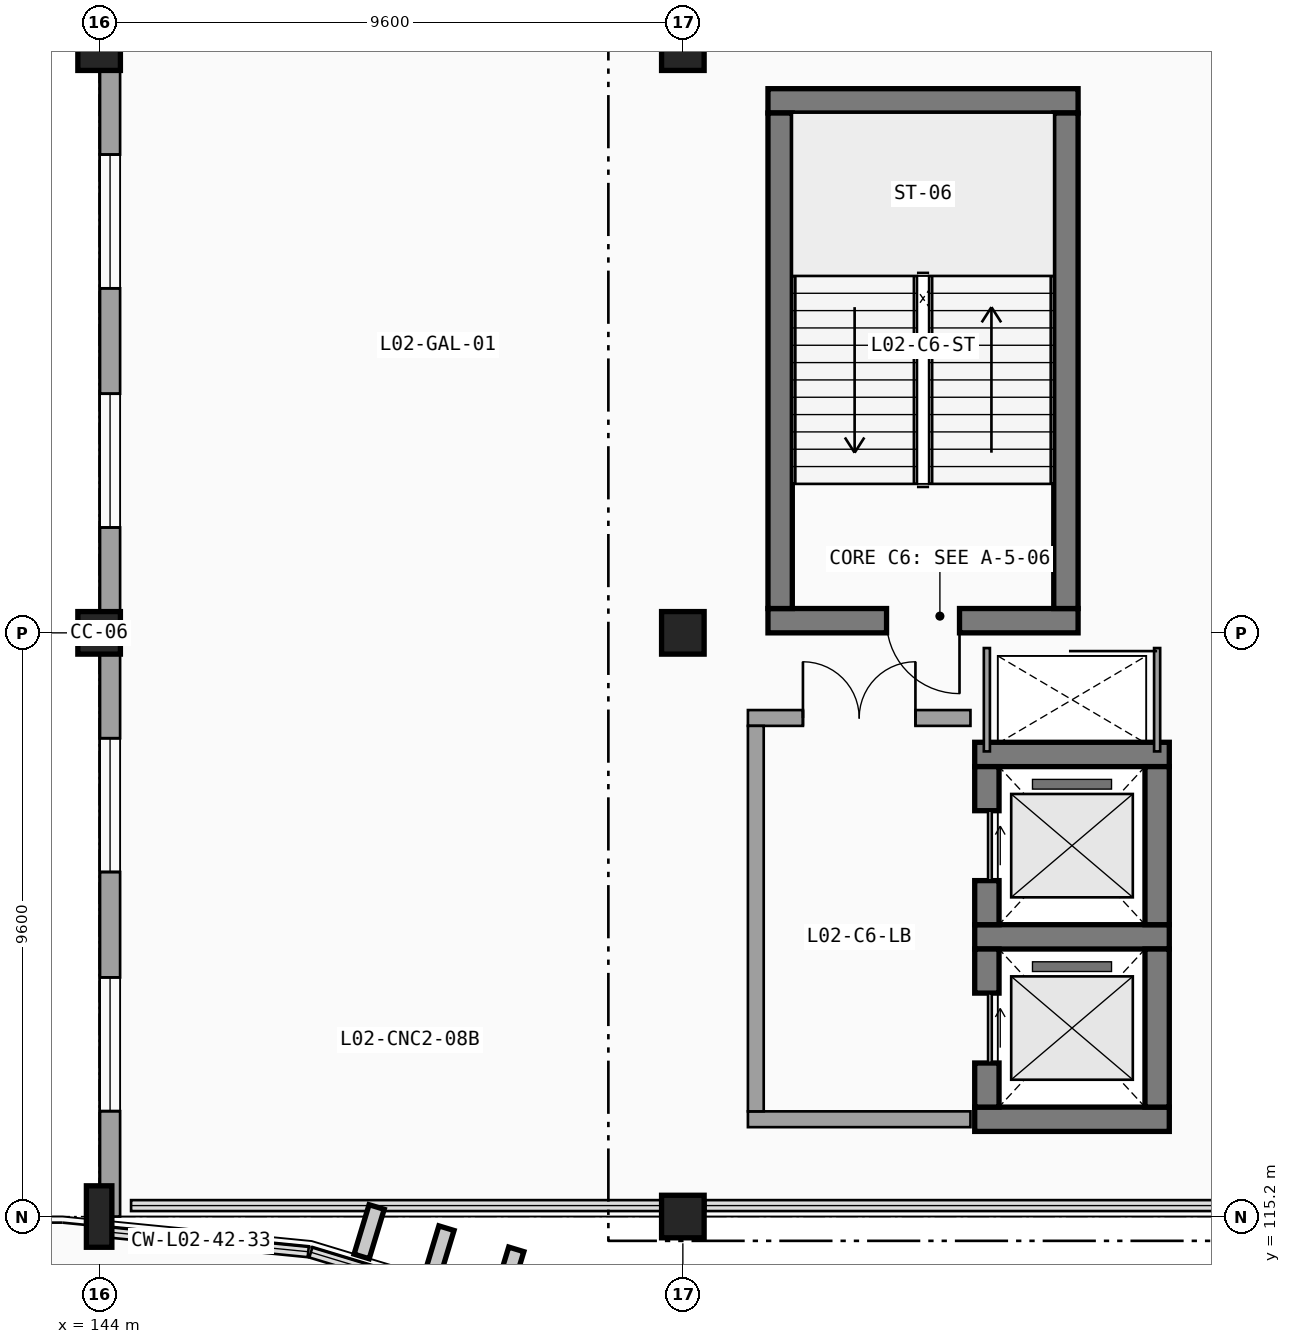
"""IFC4 building model, lengths in metres.
Left out: names, types, materials, properties, quantities, classifications, styles, units other than length and angle.
Written with IfcOpenShell. Run it as: python <this file> out.ifc"""

import sys

from ifc_helpers import new_model, si_unit, direction, frame, frame_2d, origin, origin_2d, place, context, subcontext, project, spatial, rectangle, i_section, extrude, element, fill, save


model = new_model("IFC4")
c1 = context("Model", 3, precision=1e-05, world=origin(), true_north=direction((0.0, 1.0)))
c2 = subcontext(c1, "Body", "Model", "MODEL_VIEW")
j1 = project(units=[si_unit("LENGTHUNIT", "METRE"), si_unit("PLANEANGLEUNIT", "RADIAN")], contexts=[c1])
p1 = place(None, origin())
s1 = spatial("IfcSite", under=j1, at=p1, CompositionType="ELEMENT")
p2 = place(p1, origin())
s2 = spatial("IfcBuilding", under=s1, at=p2, CompositionType="ELEMENT")
p3 = place(p2, frame((0.0, 0.0, 9.6)))
s3 = spatial("IfcBuildingStorey", under=s2, at=p3, CompositionType="ELEMENT", Elevation=9.6)
p4 = place(p3, frame((144.0, 115.2, 0.0), z_axis=(0.0, 0.0, 1.0), x_axis=(1.0, 0.0, 0.0)))
e1 = element("IfcColumn", 1, at=p4, inside=s3, PredefinedType="COLUMN", context=c2, shape_type="SweptSolid", body=[
    extrude(i_section(OverallWidth=0.419, OverallDepth=1.011, WebThickness=0.024, FlangeThickness=0.042, FilletRadius=0.031, at=origin_2d()), origin(), (0.0, 0.0, 1.0), 4.5),
])
for number, where, z_axis, x_axis in (
    (2, (144.0, 124.8, 0.0), (0.0, 0.0, 1.0), (1.0, 0.0, 0.0)),
    (3, (144.0, 134.4, 0.0), (0.0, 0.0, 1.0), (1.0, 0.0, 0.0)),
    (4, (153.6, 115.2, 0.0), (0.0, 0.0, 1.0), (1.0, 0.0, 0.0)),
    (5, (153.6, 124.8, 0.0), (0.0, 0.0, 1.0), (1.0, 0.0, 0.0)),
    (6, (153.6, 134.4, 0.0), (0.0, 0.0, 1.0), (1.0, 0.0, 0.0)),
):
    element("IfcColumn", number, at=place(p3, frame(where, z_axis=z_axis, x_axis=x_axis)), inside=s3, PredefinedType="COLUMN", context=c2, shape_type="SweptSolid", body=[
        extrude(rectangle(XDim=0.7, YDim=0.7, at=origin_2d()), origin(), (0.0, 0.0, 1.0), 4.5),
    ])
p5 = place(p3, frame((144.18, 134.4, 0.0), z_axis=(0.0, 0.0, 1.0), x_axis=(0.0, -1.0, 0.0)))
e7 = element("IfcWall", 7, at=p5, inside=s3, PredefinedType="SOLIDWALL", context=c2, shape_type="SweptSolid", body=[
    extrude(rectangle(XDim=9.6, YDim=0.33, at=frame_2d((4.8, 0.0))), origin(), (0.0, 0.0, 1.0), 3.613),
])
p6 = place(p5, frame((3.933, 0.0, 0.95), z_axis=(0.0, 0.0, 1.0), x_axis=(-1.0, 0.0, 0.0)))
e8 = element("IfcOpeningElement", 8, at=p6, cuts=e7, PredefinedType="OPENING", context=c2, shape_type="SweptSolid", body=[
    extrude(rectangle(XDim=2.2, YDim=2.1, at=frame_2d((1.1, 1.05))), frame((0.0, 0.175, 0.0), z_axis=(0.0, -1.0, 0.0), x_axis=(1.0, 0.0, 0.0)), (0.0, 0.0, 1.0), 0.35),
])
p7 = place(p5, frame((7.867, 0.0, 0.95), z_axis=(0.0, 0.0, 1.0), x_axis=(-1.0, 0.0, 0.0)))
e9 = element("IfcOpeningElement", 9, at=p7, cuts=e7, PredefinedType="OPENING", context=c2, shape_type="SweptSolid", body=[
    extrude(rectangle(XDim=2.2, YDim=2.1, at=frame_2d((1.1, 1.05))), frame((0.0, 0.175, 0.0), z_axis=(0.0, -1.0, 0.0), x_axis=(1.0, 0.0, 0.0)), (0.0, 0.0, 1.0), 0.35),
])
p8 = place(p3, frame((144.18, 124.8, 0.0), z_axis=(0.0, 0.0, 1.0), x_axis=(0.0, -1.0, 0.0)))
e10 = element("IfcWall", 10, at=p8, inside=s3, PredefinedType="SOLIDWALL", context=c2, shape_type="SweptSolid", body=[
    extrude(rectangle(XDim=9.6, YDim=0.33, at=frame_2d((4.8, 0.0))), origin(), (0.0, 0.0, 1.0), 3.293),
])
p9 = place(p8, frame((3.933, 0.0, 0.95), z_axis=(0.0, 0.0, 1.0), x_axis=(-1.0, 0.0, 0.0)))
e11 = element("IfcOpeningElement", 11, at=p9, cuts=e10, PredefinedType="OPENING", context=c2, shape_type="SweptSolid", body=[
    extrude(rectangle(XDim=2.2, YDim=2.1, at=frame_2d((1.1, 1.05))), frame((0.0, 0.175, 0.0), z_axis=(0.0, -1.0, 0.0), x_axis=(1.0, 0.0, 0.0)), (0.0, 0.0, 1.0), 0.35),
])
p10 = place(p8, frame((7.867, 0.0, 0.95), z_axis=(0.0, 0.0, 1.0), x_axis=(-1.0, 0.0, 0.0)))
e12 = element("IfcOpeningElement", 12, at=p10, cuts=e10, PredefinedType="OPENING", context=c2, shape_type="SweptSolid", body=[
    extrude(rectangle(XDim=2.2, YDim=2.1, at=frame_2d((1.1, 1.05))), frame((0.0, 0.175, 0.0), z_axis=(0.0, -1.0, 0.0), x_axis=(1.0, 0.0, 0.0)), (0.0, 0.0, 1.0), 0.35),
])
p11 = place(p3, frame((155.0, 125.0, 0.0), z_axis=(0.0, 0.0, 1.0), x_axis=(1.0, 0.0, 0.0)))
e13 = element("IfcWall", 13, at=p11, inside=s3, PredefinedType="SHEAR", context=c2, shape_type="SweptSolid", body=[
    extrude(rectangle(XDim=5.1, YDim=0.4, at=frame_2d((2.55, 0.0))), origin(), (0.0, 0.0, 1.0), 4.22),
])
p12 = place(p11, frame((3.15, 0.0, 0.0), z_axis=(0.0, 0.0, 1.0), x_axis=(-1.0, 0.0, 0.0)))
e14 = element("IfcOpeningElement", 14, at=p12, cuts=e13, PredefinedType="OPENING", context=c2, shape_type="SweptSolid", body=[
    extrude(rectangle(XDim=1.2, YDim=2.2, at=frame_2d((0.6, 1.1))), frame((0.0, 0.21, 0.0), z_axis=(0.0, -1.0, 0.0), x_axis=(1.0, 0.0, 0.0)), (0.0, 0.0, 1.0), 0.42),
])
p13 = place(p3, frame((160.1, 133.55, 0.0), z_axis=(0.0, 0.0, 1.0), x_axis=(-1.0, 0.0, 0.0)))
e15 = element("IfcWall", 15, at=p13, inside=s3, PredefinedType="SHEAR", context=c2, shape_type="SweptSolid", body=[
    extrude(rectangle(XDim=5.1, YDim=0.4, at=frame_2d((2.55, 0.0))), origin(), (0.0, 0.0, 1.0), 4.22),
])
for number, where, z_axis, x_axis in (
    (16, (155.2, 133.35, 0.0), (0.0, 0.0, 1.0), (0.0, -1.0, 0.0)),
    (17, (159.9, 125.2, 0.0), (0.0, 0.0, 1.0), (0.0, 1.0, 0.0)),
):
    element("IfcWall", number, at=place(p3, frame(where, z_axis=z_axis, x_axis=x_axis)), inside=s3, PredefinedType="SHEAR", context=c2, shape_type="SweptSolid", body=[
        extrude(rectangle(XDim=8.15, YDim=0.4, at=frame_2d((4.075, 0.0))), origin(), (0.0, 0.0, 1.0), 4.22),
    ])
for number, where, z_axis, x_axis in (
    (18, (158.4, 116.8, 0.0), (0.0, 0.0, 1.0), (1.0, 0.0, 0.0)),
    (19, (161.6, 119.8, 0.0), (0.0, 0.0, 1.0), (-1.0, 0.0, 0.0)),
):
    element("IfcWall", number, at=place(p3, frame(where, z_axis=z_axis, x_axis=x_axis)), inside=s3, PredefinedType="SHEAR", context=c2, shape_type="SweptSolid", body=[
        extrude(rectangle(XDim=3.2, YDim=0.4, at=frame_2d((1.6, 0.0))), origin(), (0.0, 0.0, 1.0), 4.22),
    ])
p14 = place(p3, frame((158.6, 119.6, 0.0), z_axis=(0.0, 0.0, 1.0), x_axis=(0.0, -1.0, 0.0)))
e20 = element("IfcWall", 20, at=p14, inside=s3, PredefinedType="SHEAR", context=c2, shape_type="SweptSolid", body=[
    extrude(rectangle(XDim=2.6, YDim=0.4, at=frame_2d((1.3, 0.0))), origin(), (0.0, 0.0, 1.0), 4.22),
])
p15 = place(p14, frame((0.725, 0.0, 0.0), z_axis=(0.0, 0.0, 1.0), x_axis=(1.0, 0.0, 0.0)))
e21 = element("IfcOpeningElement", 21, at=p15, cuts=e20, PredefinedType="OPENING", context=c2, shape_type="SweptSolid", body=[
    extrude(rectangle(XDim=1.15, YDim=2.2, at=frame_2d((0.575, 1.1))), frame((0.0, 0.21, 0.0), z_axis=(0.0, -1.0, 0.0), x_axis=(1.0, 0.0, 0.0)), (0.0, 0.0, 1.0), 0.42),
])
p16 = place(p3, frame((161.4, 117.0, 0.0), z_axis=(0.0, 0.0, 1.0), x_axis=(0.0, 1.0, 0.0)))
e22 = element("IfcWall", 22, at=p16, inside=s3, PredefinedType="SHEAR", context=c2, shape_type="SweptSolid", body=[
    extrude(rectangle(XDim=2.6, YDim=0.4, at=frame_2d((1.3, 0.0))), origin(), (0.0, 0.0, 1.0), 4.22),
])
p17 = place(p3, frame((161.6, 122.8, 0.0), z_axis=(0.0, 0.0, 1.0), x_axis=(-1.0, 0.0, 0.0)))
e23 = element("IfcWall", 23, at=p17, inside=s3, PredefinedType="SHEAR", context=c2, shape_type="SweptSolid", body=[
    extrude(rectangle(XDim=3.2, YDim=0.4, at=frame_2d((1.6, 0.0))), origin(), (0.0, 0.0, 1.0), 4.22),
])
p18 = place(p3, frame((158.6, 122.6, 0.0), z_axis=(0.0, 0.0, 1.0), x_axis=(0.0, -1.0, 0.0)))
e24 = element("IfcWall", 24, at=p18, inside=s3, PredefinedType="SHEAR", context=c2, shape_type="SweptSolid", body=[
    extrude(rectangle(XDim=2.6, YDim=0.4, at=frame_2d((1.3, 0.0))), origin(), (0.0, 0.0, 1.0), 4.22),
])
p19 = place(p18, frame((0.725, 0.0, 0.0), z_axis=(0.0, 0.0, 1.0), x_axis=(1.0, 0.0, 0.0)))
e25 = element("IfcOpeningElement", 25, at=p19, cuts=e24, PredefinedType="OPENING", context=c2, shape_type="SweptSolid", body=[
    extrude(rectangle(XDim=1.15, YDim=2.2, at=frame_2d((0.575, 1.1))), frame((0.0, 0.21, 0.0), z_axis=(0.0, -1.0, 0.0), x_axis=(1.0, 0.0, 0.0)), (0.0, 0.0, 1.0), 0.42),
])
p20 = place(p3, frame((161.4, 120.0, 0.0), z_axis=(0.0, 0.0, 1.0), x_axis=(0.0, 1.0, 0.0)))
e26 = element("IfcWall", 26, at=p20, inside=s3, PredefinedType="SHEAR", context=c2, shape_type="SweptSolid", body=[
    extrude(rectangle(XDim=2.6, YDim=0.4, at=frame_2d((1.3, 0.0))), origin(), (0.0, 0.0, 1.0), 4.22),
])
for number, where, z_axis, x_axis in (
    (27, (158.6, 124.55, 0.0), (0.0, 0.0, 1.0), (0.0, -1.0, 0.0)),
    (28, (161.4, 122.85, 0.0), (0.0, 0.0, 1.0), (0.0, 1.0, 0.0)),
):
    element("IfcWall", number, at=place(p3, frame(where, z_axis=z_axis, x_axis=x_axis)), inside=s3, PredefinedType="PARTITIONING", context=c2, shape_type="SweptSolid", body=[
        extrude(rectangle(XDim=1.7, YDim=0.1, at=frame_2d((0.85, 0.0))), origin(), (0.0, 0.0, 1.0), 4.22),
    ])
p21 = place(p3, frame((154.67, 116.8, 0.0), z_axis=(0.0, 0.0, 1.0), x_axis=(1.0, 0.0, 0.0)))
e29 = element("IfcWall", 29, at=p21, inside=s3, PredefinedType="SOLIDWALL", context=c2, shape_type="SweptSolid", body=[
    extrude(rectangle(XDim=3.66, YDim=0.26, at=frame_2d((1.83, 0.0))), origin(), (0.0, 0.0, 1.0), 4.22),
])
p22 = place(p3, frame((158.33, 123.4, 0.0), z_axis=(0.0, 0.0, 1.0), x_axis=(-1.0, 0.0, 0.0)))
e30 = element("IfcWall", 30, at=p22, inside=s3, PredefinedType="SOLIDWALL", context=c2, shape_type="SweptSolid", body=[
    extrude(rectangle(XDim=3.66, YDim=0.26, at=frame_2d((1.83, 0.0))), origin(), (0.0, 0.0, 1.0), 4.22),
])
p23 = place(p22, frame((2.755, 0.0, 0.0), z_axis=(0.0, 0.0, 1.0), x_axis=(-1.0, 0.0, 0.0)))
e31 = element("IfcOpeningElement", 31, at=p23, cuts=e30, PredefinedType="OPENING", context=c2, shape_type="SweptSolid", body=[
    extrude(rectangle(XDim=1.85, YDim=2.25, at=frame_2d((0.925, 1.125))), frame((0.0, 0.14, 0.0), z_axis=(0.0, -1.0, 0.0), x_axis=(1.0, 0.0, 0.0)), (0.0, 0.0, 1.0), 0.28),
])
p24 = place(p3, frame((154.8, 123.27, 0.0), z_axis=(0.0, 0.0, 1.0), x_axis=(0.0, -1.0, 0.0)))
e32 = element("IfcWall", 32, at=p24, inside=s3, PredefinedType="SOLIDWALL", context=c2, shape_type="SweptSolid", body=[
    extrude(rectangle(XDim=6.34, YDim=0.26, at=frame_2d((3.17, 0.0))), origin(), (0.0, 0.0, 1.0), 4.22),
])
p25 = place(p6, origin())
e33 = element("IfcWindow", 33, at=p25, inside=s3, PartitioningType="SINGLE_PANEL", PredefinedType="WINDOW", context=c2, shape_type="SweptSolid", body=[
    extrude(rectangle(XDim=2.2, YDim=2.1, at=frame_2d((1.1, 1.05))), frame((0.0, 0.03, 0.0), z_axis=(0.0, -1.0, 0.0), x_axis=(1.0, 0.0, 0.0)), (0.0, 0.0, 1.0), 0.06),
])
fill(e8, e33)
p26 = place(p7, origin())
e34 = element("IfcWindow", 34, at=p26, inside=s3, PartitioningType="SINGLE_PANEL", PredefinedType="WINDOW", context=c2, shape_type="SweptSolid", body=[
    extrude(rectangle(XDim=2.2, YDim=2.1, at=frame_2d((1.1, 1.05))), frame((0.0, 0.03, 0.0), z_axis=(0.0, -1.0, 0.0), x_axis=(1.0, 0.0, 0.0)), (0.0, 0.0, 1.0), 0.06),
])
fill(e9, e34)
p27 = place(p9, origin())
e35 = element("IfcWindow", 35, at=p27, inside=s3, PartitioningType="SINGLE_PANEL", PredefinedType="WINDOW", context=c2, shape_type="SweptSolid", body=[
    extrude(rectangle(XDim=2.2, YDim=2.1, at=frame_2d((1.1, 1.05))), frame((0.0, 0.03, 0.0), z_axis=(0.0, -1.0, 0.0), x_axis=(1.0, 0.0, 0.0)), (0.0, 0.0, 1.0), 0.06),
])
fill(e11, e35)
p28 = place(p10, origin())
e36 = element("IfcWindow", 36, at=p28, inside=s3, PartitioningType="SINGLE_PANEL", PredefinedType="WINDOW", context=c2, shape_type="SweptSolid", body=[
    extrude(rectangle(XDim=2.2, YDim=2.1, at=frame_2d((1.1, 1.05))), frame((0.0, 0.03, 0.0), z_axis=(0.0, -1.0, 0.0), x_axis=(1.0, 0.0, 0.0)), (0.0, 0.0, 1.0), 0.06),
])
fill(e12, e36)
p29 = place(p12, origin())
e37 = element("IfcDoor", 37, at=p29, inside=s3, OperationType="SINGLE_SWING_LEFT", PredefinedType="DOOR", context=c2, shape_type="SweptSolid", body=[
    extrude(rectangle(XDim=1.2, YDim=2.2, at=frame_2d((0.6, 1.1))), frame((0.0, 0.025, 0.0), z_axis=(0.0, -1.0, 0.0), x_axis=(1.0, 0.0, 0.0)), (0.0, 0.0, 1.0), 0.05),
])
fill(e14, e37)
p30 = place(p15, origin())
e38 = element("IfcDoor", 38, at=p30, inside=s3, OperationType="SLIDING_TO_LEFT", PredefinedType="DOOR", context=c2, shape_type="SweptSolid", body=[
    extrude(rectangle(XDim=1.15, YDim=2.2, at=frame_2d((0.575, 1.1))), frame((0.0, 0.025, 0.0), z_axis=(0.0, -1.0, 0.0), x_axis=(1.0, 0.0, 0.0)), (0.0, 0.0, 1.0), 0.05),
])
fill(e21, e38)
p31 = place(p19, origin())
e39 = element("IfcDoor", 39, at=p31, inside=s3, OperationType="SLIDING_TO_LEFT", PredefinedType="DOOR", context=c2, shape_type="SweptSolid", body=[
    extrude(rectangle(XDim=1.15, YDim=2.2, at=frame_2d((0.575, 1.1))), frame((0.0, 0.025, 0.0), z_axis=(0.0, -1.0, 0.0), x_axis=(1.0, 0.0, 0.0)), (0.0, 0.0, 1.0), 0.05),
])
fill(e25, e39)
p32 = place(p23, origin())
e40 = element("IfcDoor", 40, at=p32, inside=s3, OperationType="DOUBLE_DOOR_SINGLE_SWING", PredefinedType="DOOR", context=c2, shape_type="SweptSolid", body=[
    extrude(rectangle(XDim=1.85, YDim=2.25, at=frame_2d((0.925, 1.125))), frame((0.0, 0.025, 0.0), z_axis=(0.0, -1.0, 0.0), x_axis=(1.0, 0.0, 0.0)), (0.0, 0.0, 1.0), 0.05),
])
fill(e31, e40)
save(model, sys.argv[1])
